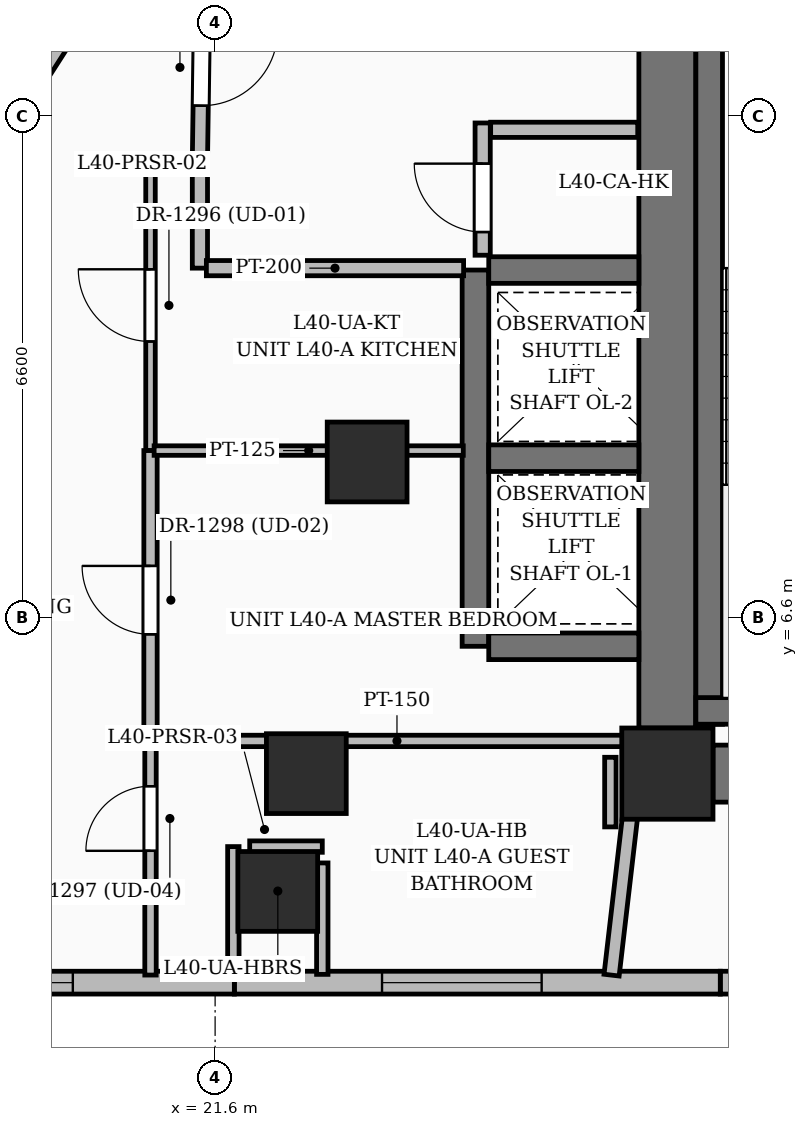
"""IFC4 building model, lengths in metres.
Left out: names, types, materials, properties, quantities, classifications, styles, units other than length and angle.
Written with IfcOpenShell. Run it as: python <this file> out.ifc"""

import sys

from ifc_helpers import new_model, si_unit, direction, frame, frame_2d, origin, origin_2d, place, context, subcontext, project, spatial, rectangle, extrude, element, fill, save


model = new_model("IFC4")
c1 = context("Model", 3, precision=1e-05, world=origin(), true_north=direction((0.0, 1.0)))
c2 = subcontext(c1, "Body", "Model", "MODEL_VIEW")
j1 = project(units=[si_unit("LENGTHUNIT", "METRE"), si_unit("PLANEANGLEUNIT", "RADIAN")], contexts=[c1])
p1 = place(None, origin())
s1 = spatial("IfcSite", under=j1, at=p1, CompositionType="ELEMENT")
p2 = place(p1, origin())
s2 = spatial("IfcBuilding", under=s1, at=p2, CompositionType="ELEMENT")
p3 = place(p2, frame((0.0, 0.0, 157.2)))
s3 = spatial("IfcBuildingStorey", under=s2, at=p3, CompositionType="ELEMENT", Elevation=157.2)
p4 = place(p3, frame((27.55, 4.55, 0.0), z_axis=(0.0, 0.0, 1.0), x_axis=(1.0, 0.0, 0.0)))
e1 = element("IfcColumn", 1, at=p4, inside=s3, PredefinedType="COLUMN", context=c2, shape_type="SweptSolid", body=[
    extrude(rectangle(XDim=1.2, YDim=1.2, at=origin_2d()), origin(), (0.0, 0.0, 1.0), 3.6),
])
for number, where, z_axis, x_axis in (
    (2, (22.8, 4.55, 0.0), (0.0, 0.0, 1.0), (1.0, 0.0, 0.0)),
    (3, (23.6, 8.65, 0.0), (0.0, 0.0, 1.0), (1.0, 0.0, 0.0)),
):
    element("IfcColumn", number, at=place(p3, frame(where, z_axis=z_axis, x_axis=x_axis)), inside=s3, PredefinedType="COLUMN", context=c2, shape_type="SweptSolid", body=[
        extrude(rectangle(XDim=1.05, YDim=1.05, at=origin_2d()), origin(), (0.0, 0.0, 1.0), 3.6),
    ])
p5 = place(p3, frame((28.15, 4.55, 0.0), z_axis=(0.0, 0.0, 1.0), x_axis=(1.0, 0.0, 0.0)))
e4 = element("IfcWall", 4, at=p5, inside=s3, PredefinedType="SHEAR", context=c2, shape_type="SweptSolid", body=[
    extrude(rectangle(XDim=6.4, YDim=0.75, at=frame_2d((3.2, 0.0))), origin(), (0.0, 0.0, 1.0), 3.6),
])
p6 = place(p3, frame((27.55, 5.15, 0.0), z_axis=(0.0, 0.0, 1.0), x_axis=(0.0, 1.0, 0.0)))
e5 = element("IfcWall", 5, at=p6, inside=s3, PredefinedType="SHEAR", context=c2, shape_type="SweptSolid", body=[
    extrude(rectangle(XDim=9.0, YDim=0.75, at=frame_2d((4.5, 0.0))), origin(), (0.0, 0.0, 1.0), 3.6),
])
p7 = place(p3, frame((28.1, 5.2, 0.0), z_axis=(0.0, 0.0, 1.0), x_axis=(0.0, 1.0, 0.0)))
e6 = element("IfcWall", 6, at=p7, inside=s3, PredefinedType="SOLIDWALL", context=c2, shape_type="SweptSolid", body=[
    extrude(rectangle(XDim=9.175, YDim=0.35, at=frame_2d((4.587, 0.0))), origin(), (0.0, 0.0, 1.0), 3.6),
])
p8 = place(p3, frame((27.925, 5.375, 0.0), z_axis=(0.0, 0.0, 1.0), x_axis=(1.0, 0.0, 0.0)))
e7 = element("IfcWall", 7, at=p8, inside=s3, PredefinedType="SOLIDWALL", context=c2, shape_type="SweptSolid", body=[
    extrude(rectangle(XDim=3.55, YDim=0.35, at=frame_2d((1.775, 0.0))), origin(), (0.0, 0.0, 1.0), 3.6),
])
p9 = place(p3, frame((25.025, 6.225, 0.0), z_axis=(0.0, 0.0, 1.0), x_axis=(0.0, 1.0, 0.0)))
e8 = element("IfcWall", 8, at=p9, inside=s3, PredefinedType="SOLIDWALL", context=c2, shape_type="SweptSolid", body=[
    extrude(rectangle(XDim=4.95, YDim=0.35, at=frame_2d((2.475, 0.0))), origin(), (0.0, 0.0, 1.0), 3.6),
])
for number, where, z_axis, x_axis in (
    (9, (25.2, 6.225, 0.0), (0.0, 0.0, 1.0), (1.0, 0.0, 0.0)),
    (10, (25.2, 8.7, 0.0), (0.0, 0.0, 1.0), (1.0, 0.0, 0.0)),
    (11, (25.2, 11.175, 0.0), (0.0, 0.0, 1.0), (1.0, 0.0, 0.0)),
):
    element("IfcWall", number, at=place(p3, frame(where, z_axis=z_axis, x_axis=x_axis)), inside=s3, PredefinedType="SOLIDWALL", context=c2, shape_type="SweptSolid", body=[
        extrude(rectangle(XDim=1.975, YDim=0.35, at=frame_2d((0.988, 0.0))), origin(), (0.0, 0.0, 1.0), 3.6),
    ])
p10 = place(p3, frame((22.424, 3.0, 0.0), z_axis=(0.0, 0.0, 1.0), x_axis=(1.0, 0.0, 0.0)))
e12 = element("IfcColumn", 12, at=p10, inside=s3, PredefinedType="COLUMN", context=c2, shape_type="SweptSolid", body=[
    extrude(rectangle(XDim=1.05, YDim=1.05, at=origin_2d()), origin(), (0.0, 0.0, 1.0), 3.6),
])
p11 = place(p3, frame((34.639, 1.8, 0.0), z_axis=(0.0, 0.0, 1.0), x_axis=(-1.0, 0.0, 0.0)))
e13 = element("IfcWall", 13, at=p11, inside=s3, PredefinedType="SOLIDWALL", context=c2, shape_type="SweptSolid", body=[
    extrude(rectangle(XDim=6.393, YDim=0.3, at=frame_2d((3.196, 0.0))), origin(), (0.0, 0.0, 1.0), 3.35),
])
p12 = place(p11, frame((1.95, 0.0, 0.6)))
e14 = element("IfcOpeningElement", 14, at=p12, cuts=e13, PredefinedType="OPENING", context=c2, shape_type="SweptSolid", body=[
    extrude(rectangle(XDim=2.4, YDim=2.1, at=frame_2d((1.2, 1.05))), frame((0.0, 0.16, 0.0), z_axis=(0.0, -1.0, 0.0), x_axis=(1.0, 0.0, 0.0)), (0.0, 0.0, 1.0), 0.32),
])
p13 = place(p3, frame((28.246, 1.8, 0.0), z_axis=(0.0, 0.0, 1.0), x_axis=(-1.0, 0.0, 0.0)))
e15 = element("IfcWall", 15, at=p13, inside=s3, PredefinedType="SOLIDWALL", context=c2, shape_type="SweptSolid", body=[
    extrude(rectangle(XDim=6.393, YDim=0.3, at=frame_2d((3.197, 0.0))), origin(), (0.0, 0.0, 1.0), 3.35),
])
p14 = place(p13, frame((2.35, 0.0, 0.55)))
e16 = element("IfcOpeningElement", 16, at=p14, cuts=e15, PredefinedType="OPENING", context=c2, shape_type="SweptSolid", body=[
    extrude(rectangle(XDim=2.1, YDim=2.4, at=frame_2d((1.05, 1.2))), frame((0.0, 0.16, 0.0), z_axis=(0.0, -1.0, 0.0), x_axis=(1.0, 0.0, 0.0)), (0.0, 0.0, 1.0), 0.32),
])
p15 = place(p3, frame((21.853, 1.8, 0.0), z_axis=(0.0, 0.0, 1.0), x_axis=(-1.0, 0.0, 0.0)))
e17 = element("IfcWall", 17, at=p15, inside=s3, PredefinedType="SOLIDWALL", context=c2, shape_type="SweptSolid", body=[
    extrude(rectangle(XDim=6.393, YDim=0.3, at=frame_2d((3.197, 0.0))), origin(), (0.0, 0.0, 1.0), 3.35),
])
p16 = place(p15, frame((2.125, 0.0, 0.6)))
e18 = element("IfcOpeningElement", 18, at=p16, cuts=e17, PredefinedType="OPENING", context=c2, shape_type="SweptSolid", body=[
    extrude(rectangle(XDim=1.8, YDim=2.1, at=frame_2d((0.9, 1.05))), frame((0.0, 0.16, 0.0), z_axis=(0.0, -1.0, 0.0), x_axis=(1.0, 0.0, 0.0)), (0.0, 0.0, 1.0), 0.32),
])
p17 = place(p3, frame((17.0, 10.227, 0.0), z_axis=(0.0, 0.0, 1.0), x_axis=(0.539500668401, 0.841985171363, 0.0)))
e19 = element("IfcWall", 19, at=p17, inside=s3, PredefinedType="SOLIDWALL", context=c2, shape_type="SweptSolid", body=[
    extrude(rectangle(XDim=5.873, YDim=0.3, at=frame_2d((2.937, 0.0))), origin(), (0.0, 0.0, 1.0), 3.35),
])
p18 = place(p17, frame((2.125, 0.0, 0.6)))
e20 = element("IfcOpeningElement", 20, at=p18, cuts=e19, PredefinedType="OPENING", context=c2, shape_type="SweptSolid", body=[
    extrude(rectangle(XDim=1.8, YDim=2.1, at=frame_2d((0.9, 1.05))), frame((0.0, 0.16, 0.0), z_axis=(0.0, -1.0, 0.0), x_axis=(1.0, 0.0, 0.0)), (0.0, 0.0, 1.0), 0.32),
])
p19 = place(p3, frame((25.12, 11.37, 0.0), z_axis=(0.0, 0.0, 1.0), x_axis=(0.0, 1.0, 0.0)))
e21 = element("IfcWall", 21, at=p19, inside=s3, PredefinedType="PARTITIONING", context=c2, shape_type="SweptSolid", body=[
    extrude(rectangle(XDim=1.74, YDim=0.2, at=frame_2d((0.87, 0.0))), origin(), (0.0, 0.0, 1.0), 3.35),
])
p20 = place(p19, frame((0.305, 0.0, 0.0)))
e22 = element("IfcOpeningElement", 22, at=p20, cuts=e21, PredefinedType="OPENING", context=c2, shape_type="SweptSolid", body=[
    extrude(rectangle(XDim=0.9, YDim=2.1, at=frame_2d((0.45, 1.05))), frame((0.0, 0.11, 0.0), z_axis=(0.0, -1.0, 0.0), x_axis=(1.0, 0.0, 0.0)), (0.0, 0.0, 1.0), 0.22),
])
p21 = place(p3, frame((25.225, 13.02, 0.0), z_axis=(0.0, 0.0, 1.0), x_axis=(1.0, 0.0, 0.0)))
e23 = element("IfcWall", 23, at=p21, inside=s3, PredefinedType="PARTITIONING", context=c2, shape_type="SweptSolid", body=[
    extrude(rectangle(XDim=1.935, YDim=0.2, at=frame_2d((0.967, 0.0))), origin(), (0.0, 0.0, 1.0), 3.35),
])
p22 = place(p3, frame((21.433, 14.956, 0.0), z_axis=(0.0, 0.0, 1.0), x_axis=(-0.014212611143, -0.999898995741, 0.0)))
e24 = element("IfcWall", 24, at=p22, inside=s3, PredefinedType="PARTITIONING", context=c2, shape_type="SweptSolid", body=[
    extrude(rectangle(XDim=2.336, YDim=0.2, at=frame_2d((1.168, 0.0))), origin(), (0.0, 0.0, 1.0), 2.57),
])
p23 = place(p22, frame((0.619, 0.0, 0.0)))
e25 = element("IfcOpeningElement", 25, at=p23, cuts=e24, PredefinedType="OPENING", context=c2, shape_type="SweptSolid", body=[
    extrude(rectangle(XDim=1.0, YDim=2.2, at=frame_2d((0.5, 1.1))), frame((0.0, 0.11, 0.0), z_axis=(0.0, -1.0, 0.0), x_axis=(1.0, 0.0, 0.0)), (0.0, 0.0, 1.0), 0.22),
])
p24 = place(p3, frame((21.4, 12.62, 0.0), z_axis=(0.0, 0.0, 1.0), x_axis=(0.0, -1.0, 0.0)))
e26 = element("IfcWall", 26, at=p24, inside=s3, PredefinedType="PARTITIONING", context=c2, shape_type="SweptSolid", body=[
    extrude(rectangle(XDim=1.42, YDim=0.2, at=frame_2d((0.71, 0.0))), origin(), (0.0, 0.0, 1.0), 3.35),
])
p25 = place(p3, frame((21.485, 11.2, 0.0), z_axis=(0.0, 0.0, 1.0), x_axis=(1.0, 0.0, 0.0)))
e27 = element("IfcWall", 27, at=p25, inside=s3, PredefinedType="PARTITIONING", context=c2, shape_type="SweptSolid", body=[
    extrude(rectangle(XDim=3.384, YDim=0.2, at=frame_2d((1.692, 0.0))), origin(), (0.0, 0.0, 1.0), 3.35),
])
p26 = place(p3, frame((20.75, 1.9, 0.0), z_axis=(0.0, 0.0, 1.0), x_axis=(0.0, 1.0, 0.0)))
e28 = element("IfcWall", 28, at=p26, inside=s3, PredefinedType="PARTITIONING", context=c2, shape_type="SweptSolid", body=[
    extrude(rectangle(XDim=3.08, YDim=0.15, at=frame_2d((1.54, 0.0))), origin(), (0.0, 0.0, 1.0), 3.35),
])
p27 = place(p26, frame((1.635, 0.0, 0.0)))
e29 = element("IfcOpeningElement", 29, at=p27, cuts=e28, PredefinedType="OPENING", context=c2, shape_type="SweptSolid", body=[
    extrude(rectangle(XDim=0.85, YDim=2.1, at=frame_2d((0.425, 1.05))), frame((0.0, 0.085, 0.0), z_axis=(0.0, -1.0, 0.0), x_axis=(1.0, 0.0, 0.0)), (0.0, 0.0, 1.0), 0.17),
])
p28 = place(p3, frame((20.75, 8.8, 0.0), z_axis=(0.0, 0.0, 1.0), x_axis=(0.0, 1.0, 0.0)))
e30 = element("IfcWall", 30, at=p28, inside=s3, PredefinedType="PARTITIONING", context=c2, shape_type="SweptSolid", body=[
    extrude(rectangle(XDim=3.82, YDim=0.125, at=frame_2d((1.91, 0.0))), origin(), (0.0, 0.0, 1.0), 2.393),
])
p29 = place(p28, frame((1.435, 0.0, 0.0)))
e31 = element("IfcOpeningElement", 31, at=p29, cuts=e30, PredefinedType="OPENING", context=c2, shape_type="SweptSolid", body=[
    extrude(rectangle(XDim=0.95, YDim=2.2, at=frame_2d((0.475, 1.1))), frame((0.0, 0.072, 0.0), z_axis=(0.0, -1.0, 0.0), x_axis=(1.0, 0.0, 0.0)), (0.0, 0.0, 1.0), 0.145),
])
p30 = place(p3, frame((20.798, 12.62, 0.0), z_axis=(0.0, 0.0, 1.0), x_axis=(1.0, 0.0, 0.0)))
e32 = element("IfcWall", 32, at=p30, inside=s3, PredefinedType="PARTITIONING", context=c2, shape_type="SweptSolid", body=[
    extrude(rectangle(XDim=0.517, YDim=0.125, at=frame_2d((0.259, 0.0))), origin(), (0.0, 0.0, 1.0), 3.35),
])
p31 = place(p3, frame((20.75, 4.98, 0.0), z_axis=(0.0, 0.0, 1.0), x_axis=(0.0, 1.0, 0.0)))
e33 = element("IfcWall", 33, at=p31, inside=s3, PredefinedType="PARTITIONING", context=c2, shape_type="SweptSolid", body=[
    extrude(rectangle(XDim=3.82, YDim=0.175, at=frame_2d((1.91, 0.0))), origin(), (0.0, 0.0, 1.0), 2.57),
])
p32 = place(p31, frame((1.403, 0.0, 0.0)))
e34 = element("IfcOpeningElement", 34, at=p32, cuts=e33, PredefinedType="OPENING", context=c2, shape_type="SweptSolid", body=[
    extrude(rectangle(XDim=0.9, YDim=2.15, at=frame_2d((0.45, 1.075))), frame((0.0, 0.097, 0.0), z_axis=(0.0, -1.0, 0.0), x_axis=(1.0, 0.0, 0.0)), (0.0, 0.0, 1.0), 0.195),
])
p33 = place(p3, frame((27.175, 4.98, 0.0), z_axis=(0.0, 0.0, 1.0), x_axis=(-1.0, 0.0, 0.0)))
e35 = element("IfcWall", 35, at=p33, inside=s3, PredefinedType="PARTITIONING", context=c2, shape_type="SweptSolid", body=[
    extrude(rectangle(XDim=6.365, YDim=0.15, at=frame_2d((3.183, 0.0))), origin(), (0.0, 0.0, 1.0), 2.57),
])
p34 = place(p3, frame((26.816, 1.899, 0.0), z_axis=(0.0, 0.0, 1.0), x_axis=(0.115732894013, 0.993280371921, 0.0)))
e36 = element("IfcWall", 36, at=p34, inside=s3, PredefinedType="PARTITIONING", context=c2, shape_type="SweptSolid", body=[
    extrude(rectangle(XDim=3.042, YDim=0.2, at=frame_2d((1.521, 0.0))), origin(), (0.0, 0.0, 1.0), 2.57),
])
p35 = place(p3, frame((20.798, 8.8, 0.0), z_axis=(0.0, 0.0, 1.0), x_axis=(1.0, 0.0, 0.0)))
e37 = element("IfcWall", 37, at=p35, inside=s3, PredefinedType="PARTITIONING", context=c2, shape_type="SweptSolid", body=[
    extrude(rectangle(XDim=4.067, YDim=0.125, at=frame_2d((2.034, 0.0))), origin(), (0.0, 0.0, 1.0), 2.393),
])
p36 = place(p3, frame((22.2, 1.889, 0.0), z_axis=(0.0, 0.0, 1.0), x_axis=(0.0, 1.0, 0.0)))
e38 = element("IfcWall", 38, at=p36, inside=s3, PredefinedType="PARTITIONING", context=c2, shape_type="SweptSolid", body=[
    extrude(rectangle(XDim=0.02, YDim=0.15, at=frame_2d((0.01, 0.0))), origin(), (0.0, 0.0, 1.0), 3.35),
])
p37 = place(p3, frame((21.84, 1.909, 0.0), z_axis=(0.0, 0.0, 1.0), x_axis=(0.0, 1.0, 0.0)))
e39 = element("IfcWall", 39, at=p37, inside=s3, PredefinedType="PARTITIONING", context=c2, shape_type="SweptSolid", body=[
    extrude(rectangle(XDim=1.681, YDim=0.15, at=frame_2d((0.841, 0.0))), origin(), (0.0, 0.0, 1.0), 2.57),
])
p38 = place(p3, frame((22.055, 3.59, 0.0), z_axis=(0.0, 0.0, 1.0), x_axis=(1.0, 0.0, 0.0)))
e40 = element("IfcWall", 40, at=p38, inside=s3, PredefinedType="PARTITIONING", context=c2, shape_type="SweptSolid", body=[
    extrude(rectangle(XDim=0.955, YDim=0.15, at=frame_2d((0.478, 0.0))), origin(), (0.0, 0.0, 1.0), 2.57),
])
p39 = place(p3, frame((23.01, 3.375, 0.0), z_axis=(0.0, 0.0, 1.0), x_axis=(0.0, -1.0, 0.0)))
e41 = element("IfcWall", 41, at=p39, inside=s3, PredefinedType="PARTITIONING", context=c2, shape_type="SweptSolid", body=[
    extrude(rectangle(XDim=1.466, YDim=0.15, at=frame_2d((0.733, 0.0))), origin(), (0.0, 0.0, 1.0), 2.57),
])
p40 = place(p3, frame((22.64, 1.909, 0.0), z_axis=(0.0, 0.0, 1.0), x_axis=(0.0, -1.0, 0.0)))
e42 = element("IfcWall", 42, at=p40, inside=s3, PredefinedType="PARTITIONING", context=c2, shape_type="SweptSolid", body=[
    extrude(rectangle(XDim=0.02, YDim=0.15, at=frame_2d((0.01, 0.0))), origin(), (0.0, 0.0, 1.0), 3.35),
])
p41 = place(p3, frame((26.8, 3.849, 0.0), z_axis=(0.0, 0.0, 1.0), x_axis=(0.0, 1.0, 0.0)))
e43 = element("IfcWall", 43, at=p41, inside=s3, PredefinedType="PARTITIONING", context=c2, shape_type="SweptSolid", body=[
    extrude(rectangle(XDim=0.916, YDim=0.15, at=frame_2d((0.458, 0.0))), origin(), (0.0, 0.0, 1.0), 2.436),
])
p42 = place(p14, origin())
e44 = element("IfcWindow", 44, at=p42, inside=s3, PartitioningType="SINGLE_PANEL", PredefinedType="WINDOW", context=c2, shape_type="SweptSolid", body=[
    extrude(rectangle(XDim=2.1, YDim=2.4, at=frame_2d((1.05, 1.2))), frame((0.0, 0.03, 0.0), z_axis=(0.0, -1.0, 0.0), x_axis=(1.0, 0.0, 0.0)), (0.0, 0.0, 1.0), 0.06),
])
fill(e16, e44)
p43 = place(p16, origin())
e45 = element("IfcWindow", 45, at=p43, inside=s3, PartitioningType="SINGLE_PANEL", PredefinedType="WINDOW", context=c2, shape_type="SweptSolid", body=[
    extrude(rectangle(XDim=1.8, YDim=2.1, at=frame_2d((0.9, 1.05))), frame((0.0, 0.03, 0.0), z_axis=(0.0, -1.0, 0.0), x_axis=(1.0, 0.0, 0.0)), (0.0, 0.0, 1.0), 0.06),
])
fill(e18, e45)
p44 = place(p20, origin())
e46 = element("IfcDoor", 46, at=p44, inside=s3, OperationType="SINGLE_SWING_RIGHT", PredefinedType="DOOR", context=c2, shape_type="SweptSolid", body=[
    extrude(rectangle(XDim=0.9, YDim=2.1, at=frame_2d((0.45, 1.05))), frame((0.0, 0.025, 0.0), z_axis=(0.0, -1.0, 0.0), x_axis=(1.0, 0.0, 0.0)), (0.0, 0.0, 1.0), 0.05),
])
fill(e22, e46)
p45 = place(p23, origin())
e47 = element("IfcDoor", 47, at=p45, inside=s3, OperationType="SINGLE_SWING_LEFT", PredefinedType="DOOR", context=c2, shape_type="SweptSolid", body=[
    extrude(rectangle(XDim=1.0, YDim=2.2, at=frame_2d((0.5, 1.1))), frame((0.0, 0.025, 0.0), z_axis=(0.0, -1.0, 0.0), x_axis=(1.0, 0.0, 0.0)), (0.0, 0.0, 1.0), 0.05),
])
fill(e25, e47)
p46 = place(p29, origin())
e48 = element("IfcDoor", 48, at=p46, inside=s3, OperationType="SINGLE_SWING_RIGHT", PredefinedType="DOOR", context=c2, shape_type="SweptSolid", body=[
    extrude(rectangle(XDim=0.95, YDim=2.2, at=frame_2d((0.475, 1.1))), frame((0.0, 0.025, 0.0), z_axis=(0.0, -1.0, 0.0), x_axis=(1.0, 0.0, 0.0)), (0.0, 0.0, 1.0), 0.05),
])
fill(e31, e48)
p47 = place(p27, origin())
e49 = element("IfcDoor", 49, at=p47, inside=s3, OperationType="SINGLE_SWING_LEFT", PredefinedType="DOOR", context=c2, shape_type="SweptSolid", body=[
    extrude(rectangle(XDim=0.85, YDim=2.1, at=frame_2d((0.425, 1.05))), frame((0.0, 0.025, 0.0), z_axis=(0.0, -1.0, 0.0), x_axis=(1.0, 0.0, 0.0)), (0.0, 0.0, 1.0), 0.05),
])
fill(e29, e49)
p48 = place(p32, origin())
e50 = element("IfcDoor", 50, at=p48, inside=s3, OperationType="SINGLE_SWING_RIGHT", PredefinedType="DOOR", context=c2, shape_type="SweptSolid", body=[
    extrude(rectangle(XDim=0.9, YDim=2.15, at=frame_2d((0.45, 1.075))), frame((0.0, 0.025, 0.0), z_axis=(0.0, -1.0, 0.0), x_axis=(1.0, 0.0, 0.0)), (0.0, 0.0, 1.0), 0.05),
])
fill(e34, e50)
save(model, sys.argv[1])
